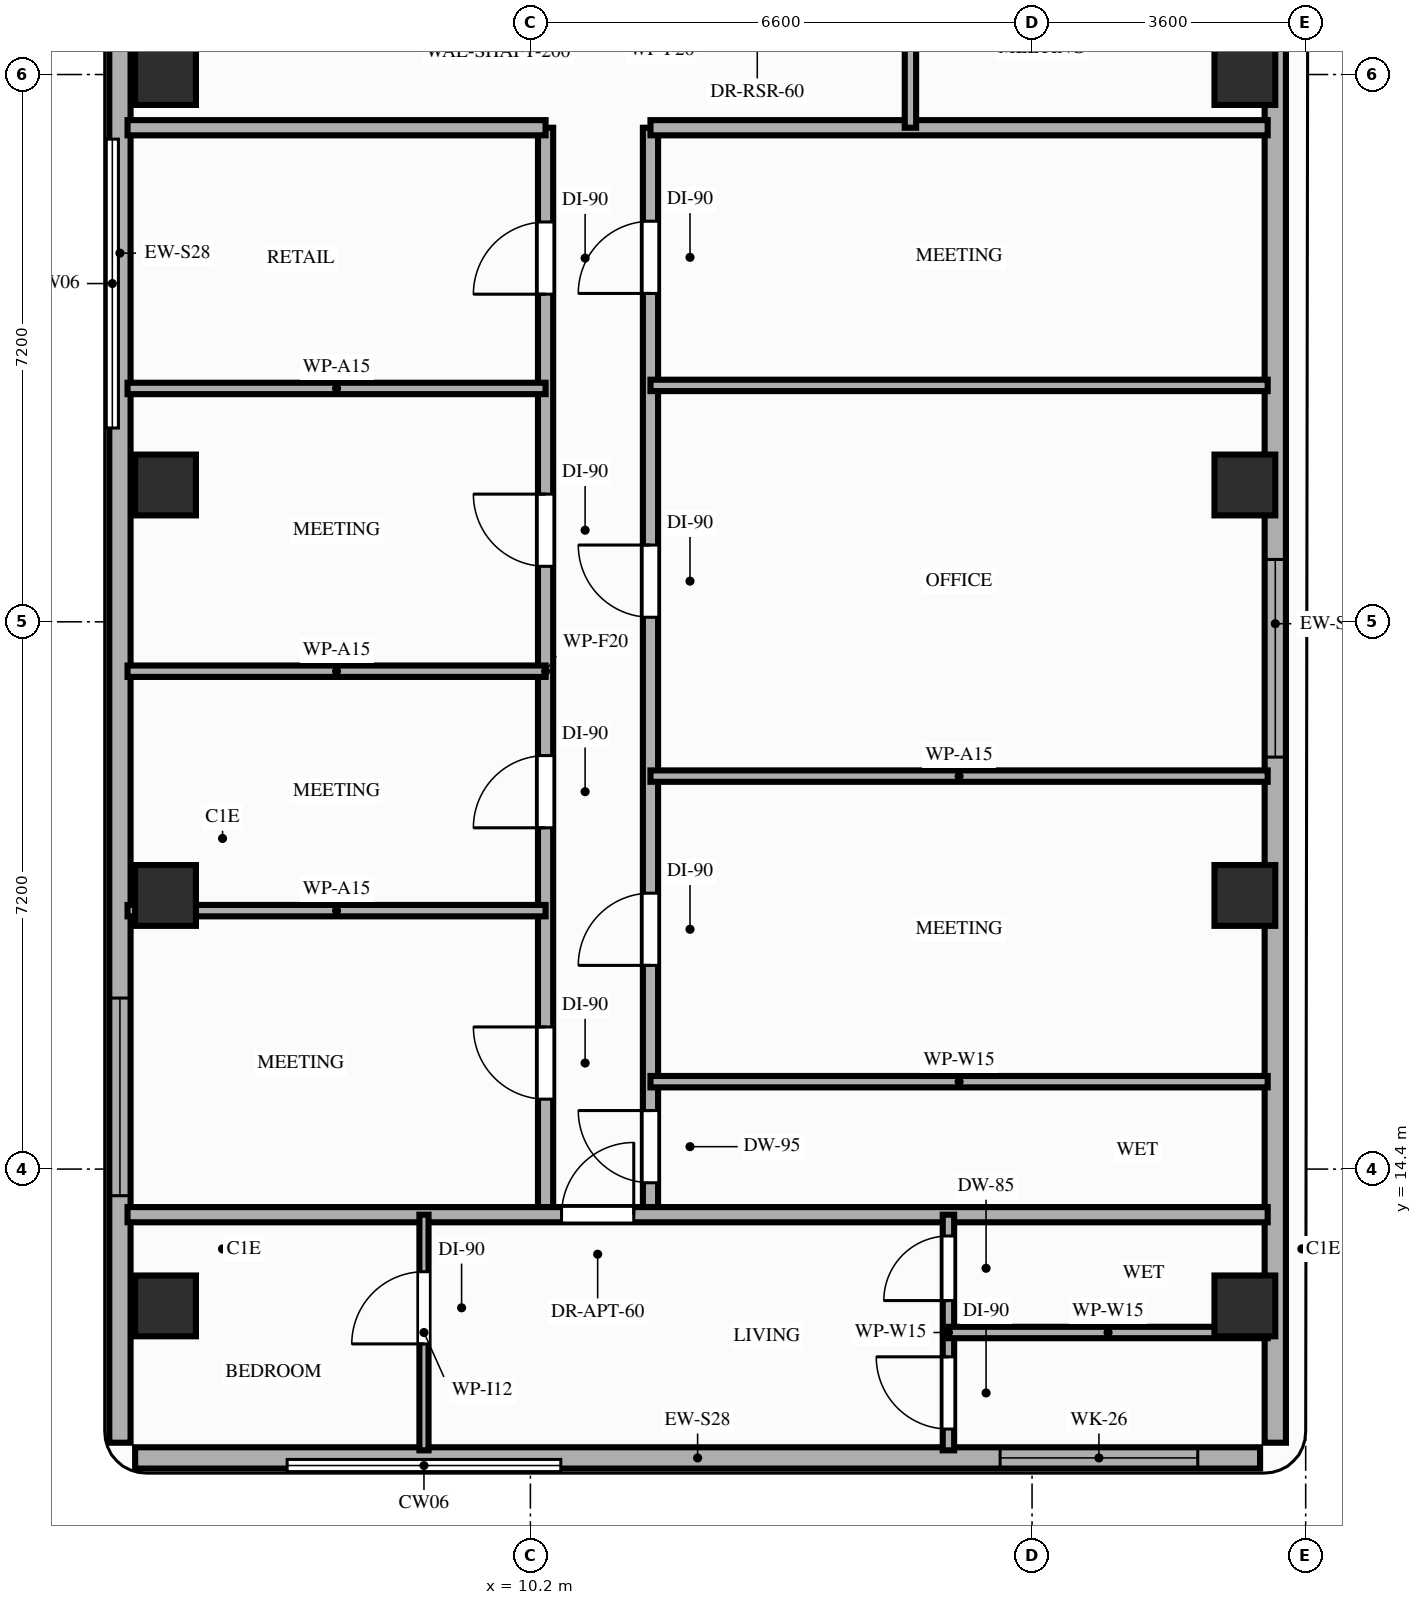
"""IFC4 building model, lengths in metres.
Left out: names, types, materials, properties, quantities, classifications, styles, units other than length and angle.
Written with IfcOpenShell. Run it as: python <this file> out.ifc"""

import sys

from ifc_helpers import new_model, si_unit, direction, frame, frame_2d, origin, origin_2d, place, context, subcontext, project, spatial, rectangle, extrude, element, fill, save


model = new_model("IFC4")
c1 = context("Model", 3, precision=1e-05, world=origin(), true_north=direction((0.0, 1.0)))
c2 = subcontext(c1, "Body", "Model", "MODEL_VIEW")
j1 = project(units=[si_unit("LENGTHUNIT", "METRE"), si_unit("PLANEANGLEUNIT", "RADIAN")], contexts=[c1])
p1 = place(None, origin())
s1 = spatial("IfcSite", under=j1, at=p1, CompositionType="ELEMENT")
p2 = place(p1, origin())
s2 = spatial("IfcBuilding", under=s1, at=p2, CompositionType="ELEMENT")
p3 = place(p2, frame((0.0, 0.0, 247.2)))
s3 = spatial("IfcBuildingStorey", under=s2, at=p3, CompositionType="ELEMENT", Elevation=247.2)
for number, where, z_axis, x_axis in (
    (1, (5.4, 12.6, 0.0), (0.0, 0.0, 1.0), (1.0, 0.0, 0.0)),
    (2, (19.6, 12.6, 0.0), (0.0, 0.0, 1.0), (1.0, 0.0, 0.0)),
    (3, (5.4, 18.0, 0.0), (0.0, 0.0, 1.0), (1.0, 0.0, 0.0)),
    (4, (19.6, 18.0, 0.0), (0.0, 0.0, 1.0), (1.0, 0.0, 0.0)),
    (5, (5.4, 23.4, 0.0), (0.0, 0.0, 1.0), (1.0, 0.0, 0.0)),
    (6, (19.6, 23.4, 0.0), (0.0, 0.0, 1.0), (1.0, 0.0, 0.0)),
    (7, (5.4, 28.8, 0.0), (0.0, 0.0, 1.0), (1.0, 0.0, 0.0)),
    (8, (19.6, 28.8, 0.0), (0.0, 0.0, 1.0), (1.0, 0.0, 0.0)),
):
    element("IfcColumn", number, at=place(p3, frame(where, z_axis=z_axis, x_axis=x_axis)), inside=s3, PredefinedType="COLUMN", context=c2, shape_type="SweptSolid", body=[
        extrude(rectangle(XDim=0.8, YDim=0.8, at=origin_2d()), origin(), (0.0, 0.0, 1.0), 3.2),
    ])
p4 = place(p3, frame((5.0, 10.6, 0.0), z_axis=(0.0, 0.0, 1.0), x_axis=(1.0, 0.0, 0.0)))
e9 = element("IfcWall", 9, at=p4, inside=s3, PredefinedType="STANDARD", context=c2, shape_type="SweptSolid", body=[
    extrude(rectangle(XDim=14.8, YDim=0.28, at=frame_2d((7.4, 0.0))), origin(), (0.0, 0.0, 1.0), 2.96),
])
p5 = place(p4, frame((11.38, 0.0, 0.85)))
e10 = element("IfcOpeningElement", 10, at=p5, cuts=e9, PredefinedType="OPENING", context=c2, shape_type="SweptSolid", body=[
    extrude(rectangle(XDim=2.6, YDim=1.86, at=frame_2d((1.3, 0.93))), frame((0.0, 0.15, 0.0), z_axis=(0.0, -1.0, 0.0), x_axis=(1.0, 0.0, 0.0)), (0.0, 0.0, 1.0), 0.3),
])
p6 = place(p3, frame((4.8, 42.1, 0.0), z_axis=(0.0, 0.0, 1.0), x_axis=(0.0, -1.0, 0.0)))
e11 = element("IfcWall", 11, at=p6, inside=s3, PredefinedType="STANDARD", context=c2, shape_type="SweptSolid", body=[
    extrude(rectangle(XDim=31.3, YDim=0.28, at=frame_2d((15.65, 0.0))), origin(), (0.0, 0.0, 1.0), 2.96),
])
p7 = place(p6, frame((25.45, 0.0, 0.85)))
e12 = element("IfcOpeningElement", 12, at=p7, cuts=e11, PredefinedType="OPENING", context=c2, shape_type="SweptSolid", body=[
    extrude(rectangle(XDim=2.6, YDim=1.86, at=frame_2d((1.3, 0.93))), frame((0.0, 0.15, 0.0), z_axis=(0.0, -1.0, 0.0), x_axis=(1.0, 0.0, 0.0)), (0.0, 0.0, 1.0), 0.3),
])
p8 = place(p6, frame((9.5, 0.0, 0.85)))
e13 = element("IfcOpeningElement", 13, at=p8, cuts=e11, PredefinedType="OPENING", context=c2, shape_type="SweptSolid", body=[
    extrude(rectangle(XDim=2.6, YDim=1.86, at=frame_2d((1.3, 0.93))), frame((0.0, 0.15, 0.0), z_axis=(0.0, -1.0, 0.0), x_axis=(1.0, 0.0, 0.0)), (0.0, 0.0, 1.0), 0.3),
])
p9 = place(p6, frame((3.4, 0.0, 0.85)))
e14 = element("IfcOpeningElement", 14, at=p9, cuts=e11, PredefinedType="OPENING", context=c2, shape_type="SweptSolid", body=[
    extrude(rectangle(XDim=2.6, YDim=1.86, at=frame_2d((1.3, 0.93))), frame((0.0, 0.15, 0.0), z_axis=(0.0, -1.0, 0.0), x_axis=(1.0, 0.0, 0.0)), (0.0, 0.0, 1.0), 0.3),
])
p10 = place(p3, frame((20.0, 10.8, 0.0), z_axis=(0.0, 0.0, 1.0), x_axis=(0.0, 1.0, 0.0)))
e15 = element("IfcWall", 15, at=p10, inside=s3, PredefinedType="STANDARD", context=c2, shape_type="SweptSolid", body=[
    extrude(rectangle(XDim=21.55, YDim=0.28, at=frame_2d((10.775, 0.0))), origin(), (0.0, 0.0, 1.0), 2.5),
])
p11 = place(p10, frame((9.02, 0.0, 0.85)))
e16 = element("IfcOpeningElement", 16, at=p11, cuts=e15, PredefinedType="OPENING", context=c2, shape_type="SweptSolid", body=[
    extrude(rectangle(XDim=2.6, YDim=1.4, at=frame_2d((1.3, 0.7))), frame((0.0, 0.15, 0.0), z_axis=(0.0, -1.0, 0.0), x_axis=(1.0, 0.0, 0.0)), (0.0, 0.0, 1.0), 0.3),
])
p12 = place(p3, frame((10.4, 13.8, 0.0), z_axis=(0.0, 0.0, 1.0), x_axis=(0.0, 1.0, 0.0)))
e17 = element("IfcWall", 17, at=p12, inside=s3, PredefinedType="PARTITIONING", context=c2, shape_type="SweptSolid", body=[
    extrude(rectangle(XDim=14.3, YDim=0.2, at=frame_2d((7.15, 0.0))), origin(), (0.0, 0.0, 1.0), 2.5),
])
p13 = place(p12, frame((1.52, 0.0, 0.0)))
e18 = element("IfcOpeningElement", 18, at=p13, cuts=e17, PredefinedType="OPENING", context=c2, shape_type="SweptSolid", body=[
    extrude(rectangle(XDim=0.95, YDim=2.15, at=frame_2d((0.475, 1.075))), frame((0.0, 0.11, 0.0), z_axis=(0.0, -1.0, 0.0), x_axis=(1.0, 0.0, 0.0)), (0.0, 0.0, 1.0), 0.22),
])
p14 = place(p12, frame((5.09, 0.0, 0.0)))
e19 = element("IfcOpeningElement", 19, at=p14, cuts=e17, PredefinedType="OPENING", context=c2, shape_type="SweptSolid", body=[
    extrude(rectangle(XDim=0.95, YDim=2.15, at=frame_2d((0.475, 1.075))), frame((0.0, 0.11, 0.0), z_axis=(0.0, -1.0, 0.0), x_axis=(1.0, 0.0, 0.0)), (0.0, 0.0, 1.0), 0.22),
])
p15 = place(p12, frame((8.53, 0.0, 0.0)))
e20 = element("IfcOpeningElement", 20, at=p15, cuts=e17, PredefinedType="OPENING", context=c2, shape_type="SweptSolid", body=[
    extrude(rectangle(XDim=0.95, YDim=2.15, at=frame_2d((0.475, 1.075))), frame((0.0, 0.11, 0.0), z_axis=(0.0, -1.0, 0.0), x_axis=(1.0, 0.0, 0.0)), (0.0, 0.0, 1.0), 0.22),
])
p16 = place(p12, frame((12.11, 0.0, 0.0)))
e21 = element("IfcOpeningElement", 21, at=p16, cuts=e17, PredefinedType="OPENING", context=c2, shape_type="SweptSolid", body=[
    extrude(rectangle(XDim=0.95, YDim=2.15, at=frame_2d((0.475, 1.075))), frame((0.0, 0.11, 0.0), z_axis=(0.0, -1.0, 0.0), x_axis=(1.0, 0.0, 0.0)), (0.0, 0.0, 1.0), 0.22),
])
p17 = place(p3, frame((11.78, 13.8, 0.0), z_axis=(0.0, 0.0, 1.0), x_axis=(0.0, 1.0, 0.0)))
e22 = element("IfcWall", 22, at=p17, inside=s3, PredefinedType="PARTITIONING", context=c2, shape_type="SweptSolid", body=[
    extrude(rectangle(XDim=14.3, YDim=0.2, at=frame_2d((7.15, 0.0))), origin(), (0.0, 0.0, 1.0), 2.5),
])
p18 = place(p17, frame((0.42, 0.0, 0.0)))
e23 = element("IfcOpeningElement", 23, at=p18, cuts=e22, PredefinedType="OPENING", context=c2, shape_type="SweptSolid", body=[
    extrude(rectangle(XDim=0.95, YDim=2.1, at=frame_2d((0.475, 1.05))), frame((0.0, 0.11, 0.0), z_axis=(0.0, -1.0, 0.0), x_axis=(1.0, 0.0, 0.0)), (0.0, 0.0, 1.0), 0.22),
])
p19 = place(p17, frame((3.28, 0.0, 0.0)))
e24 = element("IfcOpeningElement", 24, at=p19, cuts=e22, PredefinedType="OPENING", context=c2, shape_type="SweptSolid", body=[
    extrude(rectangle(XDim=0.95, YDim=2.15, at=frame_2d((0.475, 1.075))), frame((0.0, 0.11, 0.0), z_axis=(0.0, -1.0, 0.0), x_axis=(1.0, 0.0, 0.0)), (0.0, 0.0, 1.0), 0.22),
])
p20 = place(p17, frame((7.86, 0.0, 0.0)))
e25 = element("IfcOpeningElement", 25, at=p20, cuts=e22, PredefinedType="OPENING", context=c2, shape_type="SweptSolid", body=[
    extrude(rectangle(XDim=0.95, YDim=2.15, at=frame_2d((0.475, 1.075))), frame((0.0, 0.11, 0.0), z_axis=(0.0, -1.0, 0.0), x_axis=(1.0, 0.0, 0.0)), (0.0, 0.0, 1.0), 0.22),
])
p21 = place(p17, frame((12.12, 0.0, 0.0)))
e26 = element("IfcOpeningElement", 26, at=p21, cuts=e22, PredefinedType="OPENING", context=c2, shape_type="SweptSolid", body=[
    extrude(rectangle(XDim=0.95, YDim=2.15, at=frame_2d((0.475, 1.075))), frame((0.0, 0.11, 0.0), z_axis=(0.0, -1.0, 0.0), x_axis=(1.0, 0.0, 0.0)), (0.0, 0.0, 1.0), 0.22),
])
p22 = place(p3, frame((4.9, 13.8, 0.0), z_axis=(0.0, 0.0, 1.0), x_axis=(1.0, 0.0, 0.0)))
e27 = element("IfcWall", 27, at=p22, inside=s3, PredefinedType="PARTITIONING", context=c2, shape_type="SweptSolid", body=[
    extrude(rectangle(XDim=15.0, YDim=0.2, at=frame_2d((7.5, 0.0))), origin(), (0.0, 0.0, 1.0), 2.5),
])
p23 = place(p22, frame((5.71, 0.0, 0.0)))
e28 = element("IfcOpeningElement", 28, at=p23, cuts=e27, PredefinedType="OPENING", context=c2, shape_type="SweptSolid", body=[
    extrude(rectangle(XDim=0.95, YDim=2.15, at=frame_2d((0.475, 1.075))), frame((0.0, 0.11, 0.0), z_axis=(0.0, -1.0, 0.0), x_axis=(1.0, 0.0, 0.0)), (0.0, 0.0, 1.0), 0.22),
])
p24 = place(p3, frame((4.9, 28.1, 0.0), z_axis=(0.0, 0.0, 1.0), x_axis=(1.0, 0.0, 0.0)))
e29 = element("IfcWall", 29, at=p24, inside=s3, PredefinedType="PARTITIONING", context=c2, shape_type="SweptSolid", body=[
    extrude(rectangle(XDim=5.5, YDim=0.2, at=frame_2d((2.75, 0.0))), origin(), (0.0, 0.0, 1.0), 2.5),
])
p25 = place(p3, frame((11.78, 28.1, 0.0), z_axis=(0.0, 0.0, 1.0), x_axis=(1.0, 0.0, 0.0)))
e30 = element("IfcWall", 30, at=p25, inside=s3, PredefinedType="PARTITIONING", context=c2, shape_type="SweptSolid", body=[
    extrude(rectangle(XDim=8.12, YDim=0.2, at=frame_2d((4.06, 0.0))), origin(), (0.0, 0.0, 1.0), 2.5),
])
p26 = place(p3, frame((15.2, 28.1, 0.0), z_axis=(0.0, 0.0, 1.0), x_axis=(0.0, 1.0, 0.0)))
e31 = element("IfcWall", 31, at=p26, inside=s3, PredefinedType="PARTITIONING", context=c2, shape_type="SweptSolid", body=[
    extrude(rectangle(XDim=3.05, YDim=0.15, at=frame_2d((1.525, 0.0))), origin(), (0.0, 0.0, 1.0), 2.5),
])
p27 = place(p3, frame((8.8, 10.7, 0.0), z_axis=(0.0, 0.0, 1.0), x_axis=(0.0, 1.0, 0.0)))
e32 = element("IfcWall", 32, at=p27, inside=s3, PredefinedType="PARTITIONING", context=c2, shape_type="SweptSolid", body=[
    extrude(rectangle(XDim=3.1, YDim=0.12, at=frame_2d((1.55, 0.0))), origin(), (0.0, 0.0, 1.0), 2.5),
])
p28 = place(p27, frame((1.4, 0.0, 0.0)))
e33 = element("IfcOpeningElement", 33, at=p28, cuts=e32, PredefinedType="OPENING", context=c2, shape_type="SweptSolid", body=[
    extrude(rectangle(XDim=0.95, YDim=2.15, at=frame_2d((0.475, 1.075))), frame((0.0, 0.07, 0.0), z_axis=(0.0, -1.0, 0.0), x_axis=(1.0, 0.0, 0.0)), (0.0, 0.0, 1.0), 0.14),
])
p29 = place(p3, frame((15.7, 10.7, 0.0), z_axis=(0.0, 0.0, 1.0), x_axis=(0.0, 1.0, 0.0)))
e34 = element("IfcWall", 34, at=p29, inside=s3, PredefinedType="PARTITIONING", context=c2, shape_type="SweptSolid", body=[
    extrude(rectangle(XDim=3.1, YDim=0.15, at=frame_2d((1.55, 0.0))), origin(), (0.0, 0.0, 1.0), 2.5),
])
p30 = place(p29, frame((0.28, 0.0, 0.0)))
e35 = element("IfcOpeningElement", 35, at=p30, cuts=e34, PredefinedType="OPENING", context=c2, shape_type="SweptSolid", body=[
    extrude(rectangle(XDim=0.95, YDim=2.15, at=frame_2d((0.475, 1.075))), frame((0.0, 0.085, 0.0), z_axis=(0.0, -1.0, 0.0), x_axis=(1.0, 0.0, 0.0)), (0.0, 0.0, 1.0), 0.17),
])
p31 = place(p29, frame((1.97, 0.0, 0.0)))
e36 = element("IfcOpeningElement", 36, at=p31, cuts=e34, PredefinedType="OPENING", context=c2, shape_type="SweptSolid", body=[
    extrude(rectangle(XDim=0.85, YDim=2.1, at=frame_2d((0.425, 1.05))), frame((0.0, 0.085, 0.0), z_axis=(0.0, -1.0, 0.0), x_axis=(1.0, 0.0, 0.0)), (0.0, 0.0, 1.0), 0.17),
])
p32 = place(p3, frame((15.7, 12.25, 0.0), z_axis=(0.0, 0.0, 1.0), x_axis=(1.0, 0.0, 0.0)))
e37 = element("IfcWall", 37, at=p32, inside=s3, PredefinedType="PARTITIONING", context=c2, shape_type="SweptSolid", body=[
    extrude(rectangle(XDim=4.2, YDim=0.15, at=frame_2d((2.1, 0.0))), origin(), (0.0, 0.0, 1.0), 2.5),
])
for number, where, z_axis, x_axis in (
    (38, (4.9, 17.8, 0.0), (0.0, 0.0, 1.0), (1.0, 0.0, 0.0)),
    (39, (4.9, 20.95, 0.0), (0.0, 0.0, 1.0), (1.0, 0.0, 0.0)),
    (40, (4.9, 24.67, 0.0), (0.0, 0.0, 1.0), (1.0, 0.0, 0.0)),
):
    element("IfcWall", number, at=place(p3, frame(where, z_axis=z_axis, x_axis=x_axis)), inside=s3, PredefinedType="PARTITIONING", context=c2, shape_type="SweptSolid", body=[
        extrude(rectangle(XDim=5.5, YDim=0.15, at=frame_2d((2.75, 0.0))), origin(), (0.0, 0.0, 1.0), 2.5),
    ])
for number, where, z_axis, x_axis in (
    (41, (11.78, 15.55, 0.0), (0.0, 0.0, 1.0), (1.0, 0.0, 0.0)),
    (42, (11.78, 19.57, 0.0), (0.0, 0.0, 1.0), (1.0, 0.0, 0.0)),
    (43, (11.78, 24.71, 0.0), (0.0, 0.0, 1.0), (1.0, 0.0, 0.0)),
):
    element("IfcWall", number, at=place(p3, frame(where, z_axis=z_axis, x_axis=x_axis)), inside=s3, PredefinedType="PARTITIONING", context=c2, shape_type="SweptSolid", body=[
        extrude(rectangle(XDim=8.12, YDim=0.15, at=frame_2d((4.06, 0.0))), origin(), (0.0, 0.0, 1.0), 2.5),
    ])
p33 = place(p5, origin())
e44 = element("IfcWindow", 44, at=p33, inside=s3, PartitioningType="SINGLE_PANEL", PredefinedType="WINDOW", context=c2, shape_type="SweptSolid", body=[
    extrude(rectangle(XDim=2.6, YDim=1.86, at=frame_2d((1.3, 0.93))), frame((0.0, 0.03, 0.0), z_axis=(0.0, -1.0, 0.0), x_axis=(1.0, 0.0, 0.0)), (0.0, 0.0, 1.0), 0.06),
])
fill(e10, e44)
p34 = place(p7, origin())
e45 = element("IfcWindow", 45, at=p34, inside=s3, PartitioningType="SINGLE_PANEL", PredefinedType="WINDOW", context=c2, shape_type="SweptSolid", body=[
    extrude(rectangle(XDim=2.6, YDim=1.86, at=frame_2d((1.3, 0.93))), frame((0.0, 0.03, 0.0), z_axis=(0.0, -1.0, 0.0), x_axis=(1.0, 0.0, 0.0)), (0.0, 0.0, 1.0), 0.06),
])
fill(e12, e45)
p35 = place(p11, origin())
e46 = element("IfcWindow", 46, at=p35, inside=s3, PartitioningType="SINGLE_PANEL", PredefinedType="WINDOW", context=c2, shape_type="SweptSolid", body=[
    extrude(rectangle(XDim=2.6, YDim=1.4, at=frame_2d((1.3, 0.7))), frame((0.0, 0.03, 0.0), z_axis=(0.0, -1.0, 0.0), x_axis=(1.0, 0.0, 0.0)), (0.0, 0.0, 1.0), 0.06),
])
fill(e16, e46)
p36 = place(p23, origin())
e47 = element("IfcDoor", 47, at=p36, inside=s3, OperationType="SINGLE_SWING_RIGHT", PredefinedType="DOOR", context=c2, shape_type="SweptSolid", body=[
    extrude(rectangle(XDim=0.95, YDim=2.15, at=frame_2d((0.475, 1.075))), frame((0.0, 0.025, 0.0), z_axis=(0.0, -1.0, 0.0), x_axis=(1.0, 0.0, 0.0)), (0.0, 0.0, 1.0), 0.05),
])
fill(e28, e47)
p37 = place(p28, origin())
e48 = element("IfcDoor", 48, at=p37, inside=s3, OperationType="SINGLE_SWING_LEFT", PredefinedType="DOOR", context=c2, shape_type="SweptSolid", body=[
    extrude(rectangle(XDim=0.95, YDim=2.15, at=frame_2d((0.475, 1.075))), frame((0.0, 0.025, 0.0), z_axis=(0.0, -1.0, 0.0), x_axis=(1.0, 0.0, 0.0)), (0.0, 0.0, 1.0), 0.05),
])
fill(e33, e48)
p38 = place(p30, origin())
e49 = element("IfcDoor", 49, at=p38, inside=s3, OperationType="SINGLE_SWING_RIGHT", PredefinedType="DOOR", context=c2, shape_type="SweptSolid", body=[
    extrude(rectangle(XDim=0.95, YDim=2.15, at=frame_2d((0.475, 1.075))), frame((0.0, 0.025, 0.0), z_axis=(0.0, -1.0, 0.0), x_axis=(1.0, 0.0, 0.0)), (0.0, 0.0, 1.0), 0.05),
])
fill(e35, e49)
p39 = place(p31, origin())
e50 = element("IfcDoor", 50, at=p39, inside=s3, OperationType="SINGLE_SWING_LEFT", PredefinedType="DOOR", context=c2, shape_type="SweptSolid", body=[
    extrude(rectangle(XDim=0.85, YDim=2.1, at=frame_2d((0.425, 1.05))), frame((0.0, 0.025, 0.0), z_axis=(0.0, -1.0, 0.0), x_axis=(1.0, 0.0, 0.0)), (0.0, 0.0, 1.0), 0.05),
])
fill(e36, e50)
p40 = place(p13, origin())
e51 = element("IfcDoor", 51, at=p40, inside=s3, OperationType="SINGLE_SWING_RIGHT", PredefinedType="DOOR", context=c2, shape_type="SweptSolid", body=[
    extrude(rectangle(XDim=0.95, YDim=2.15, at=frame_2d((0.475, 1.075))), frame((0.0, 0.025, 0.0), z_axis=(0.0, -1.0, 0.0), x_axis=(1.0, 0.0, 0.0)), (0.0, 0.0, 1.0), 0.05),
])
fill(e18, e51)
p41 = place(p14, origin())
e52 = element("IfcDoor", 52, at=p41, inside=s3, OperationType="SINGLE_SWING_LEFT", PredefinedType="DOOR", context=c2, shape_type="SweptSolid", body=[
    extrude(rectangle(XDim=0.95, YDim=2.15, at=frame_2d((0.475, 1.075))), frame((0.0, 0.025, 0.0), z_axis=(0.0, -1.0, 0.0), x_axis=(1.0, 0.0, 0.0)), (0.0, 0.0, 1.0), 0.05),
])
fill(e19, e52)
p42 = place(p15, origin())
e53 = element("IfcDoor", 53, at=p42, inside=s3, OperationType="SINGLE_SWING_RIGHT", PredefinedType="DOOR", context=c2, shape_type="SweptSolid", body=[
    extrude(rectangle(XDim=0.95, YDim=2.15, at=frame_2d((0.475, 1.075))), frame((0.0, 0.025, 0.0), z_axis=(0.0, -1.0, 0.0), x_axis=(1.0, 0.0, 0.0)), (0.0, 0.0, 1.0), 0.05),
])
fill(e20, e53)
p43 = place(p16, origin())
e54 = element("IfcDoor", 54, at=p43, inside=s3, OperationType="SINGLE_SWING_LEFT", PredefinedType="DOOR", context=c2, shape_type="SweptSolid", body=[
    extrude(rectangle(XDim=0.95, YDim=2.15, at=frame_2d((0.475, 1.075))), frame((0.0, 0.025, 0.0), z_axis=(0.0, -1.0, 0.0), x_axis=(1.0, 0.0, 0.0)), (0.0, 0.0, 1.0), 0.05),
])
fill(e21, e54)
p44 = place(p18, origin())
e55 = element("IfcDoor", 55, at=p44, inside=s3, OperationType="SINGLE_SWING_RIGHT", PredefinedType="DOOR", context=c2, shape_type="SweptSolid", body=[
    extrude(rectangle(XDim=0.95, YDim=2.1, at=frame_2d((0.475, 1.05))), frame((0.0, 0.025, 0.0), z_axis=(0.0, -1.0, 0.0), x_axis=(1.0, 0.0, 0.0)), (0.0, 0.0, 1.0), 0.05),
])
fill(e23, e55)
p45 = place(p19, origin())
e56 = element("IfcDoor", 56, at=p45, inside=s3, OperationType="SINGLE_SWING_LEFT", PredefinedType="DOOR", context=c2, shape_type="SweptSolid", body=[
    extrude(rectangle(XDim=0.95, YDim=2.15, at=frame_2d((0.475, 1.075))), frame((0.0, 0.025, 0.0), z_axis=(0.0, -1.0, 0.0), x_axis=(1.0, 0.0, 0.0)), (0.0, 0.0, 1.0), 0.05),
])
fill(e24, e56)
p46 = place(p20, origin())
e57 = element("IfcDoor", 57, at=p46, inside=s3, OperationType="SINGLE_SWING_RIGHT", PredefinedType="DOOR", context=c2, shape_type="SweptSolid", body=[
    extrude(rectangle(XDim=0.95, YDim=2.15, at=frame_2d((0.475, 1.075))), frame((0.0, 0.025, 0.0), z_axis=(0.0, -1.0, 0.0), x_axis=(1.0, 0.0, 0.0)), (0.0, 0.0, 1.0), 0.05),
])
fill(e25, e57)
p47 = place(p21, origin())
e58 = element("IfcDoor", 58, at=p47, inside=s3, OperationType="SINGLE_SWING_LEFT", PredefinedType="DOOR", context=c2, shape_type="SweptSolid", body=[
    extrude(rectangle(XDim=0.95, YDim=2.15, at=frame_2d((0.475, 1.075))), frame((0.0, 0.025, 0.0), z_axis=(0.0, -1.0, 0.0), x_axis=(1.0, 0.0, 0.0)), (0.0, 0.0, 1.0), 0.05),
])
fill(e26, e58)
save(model, sys.argv[1])
